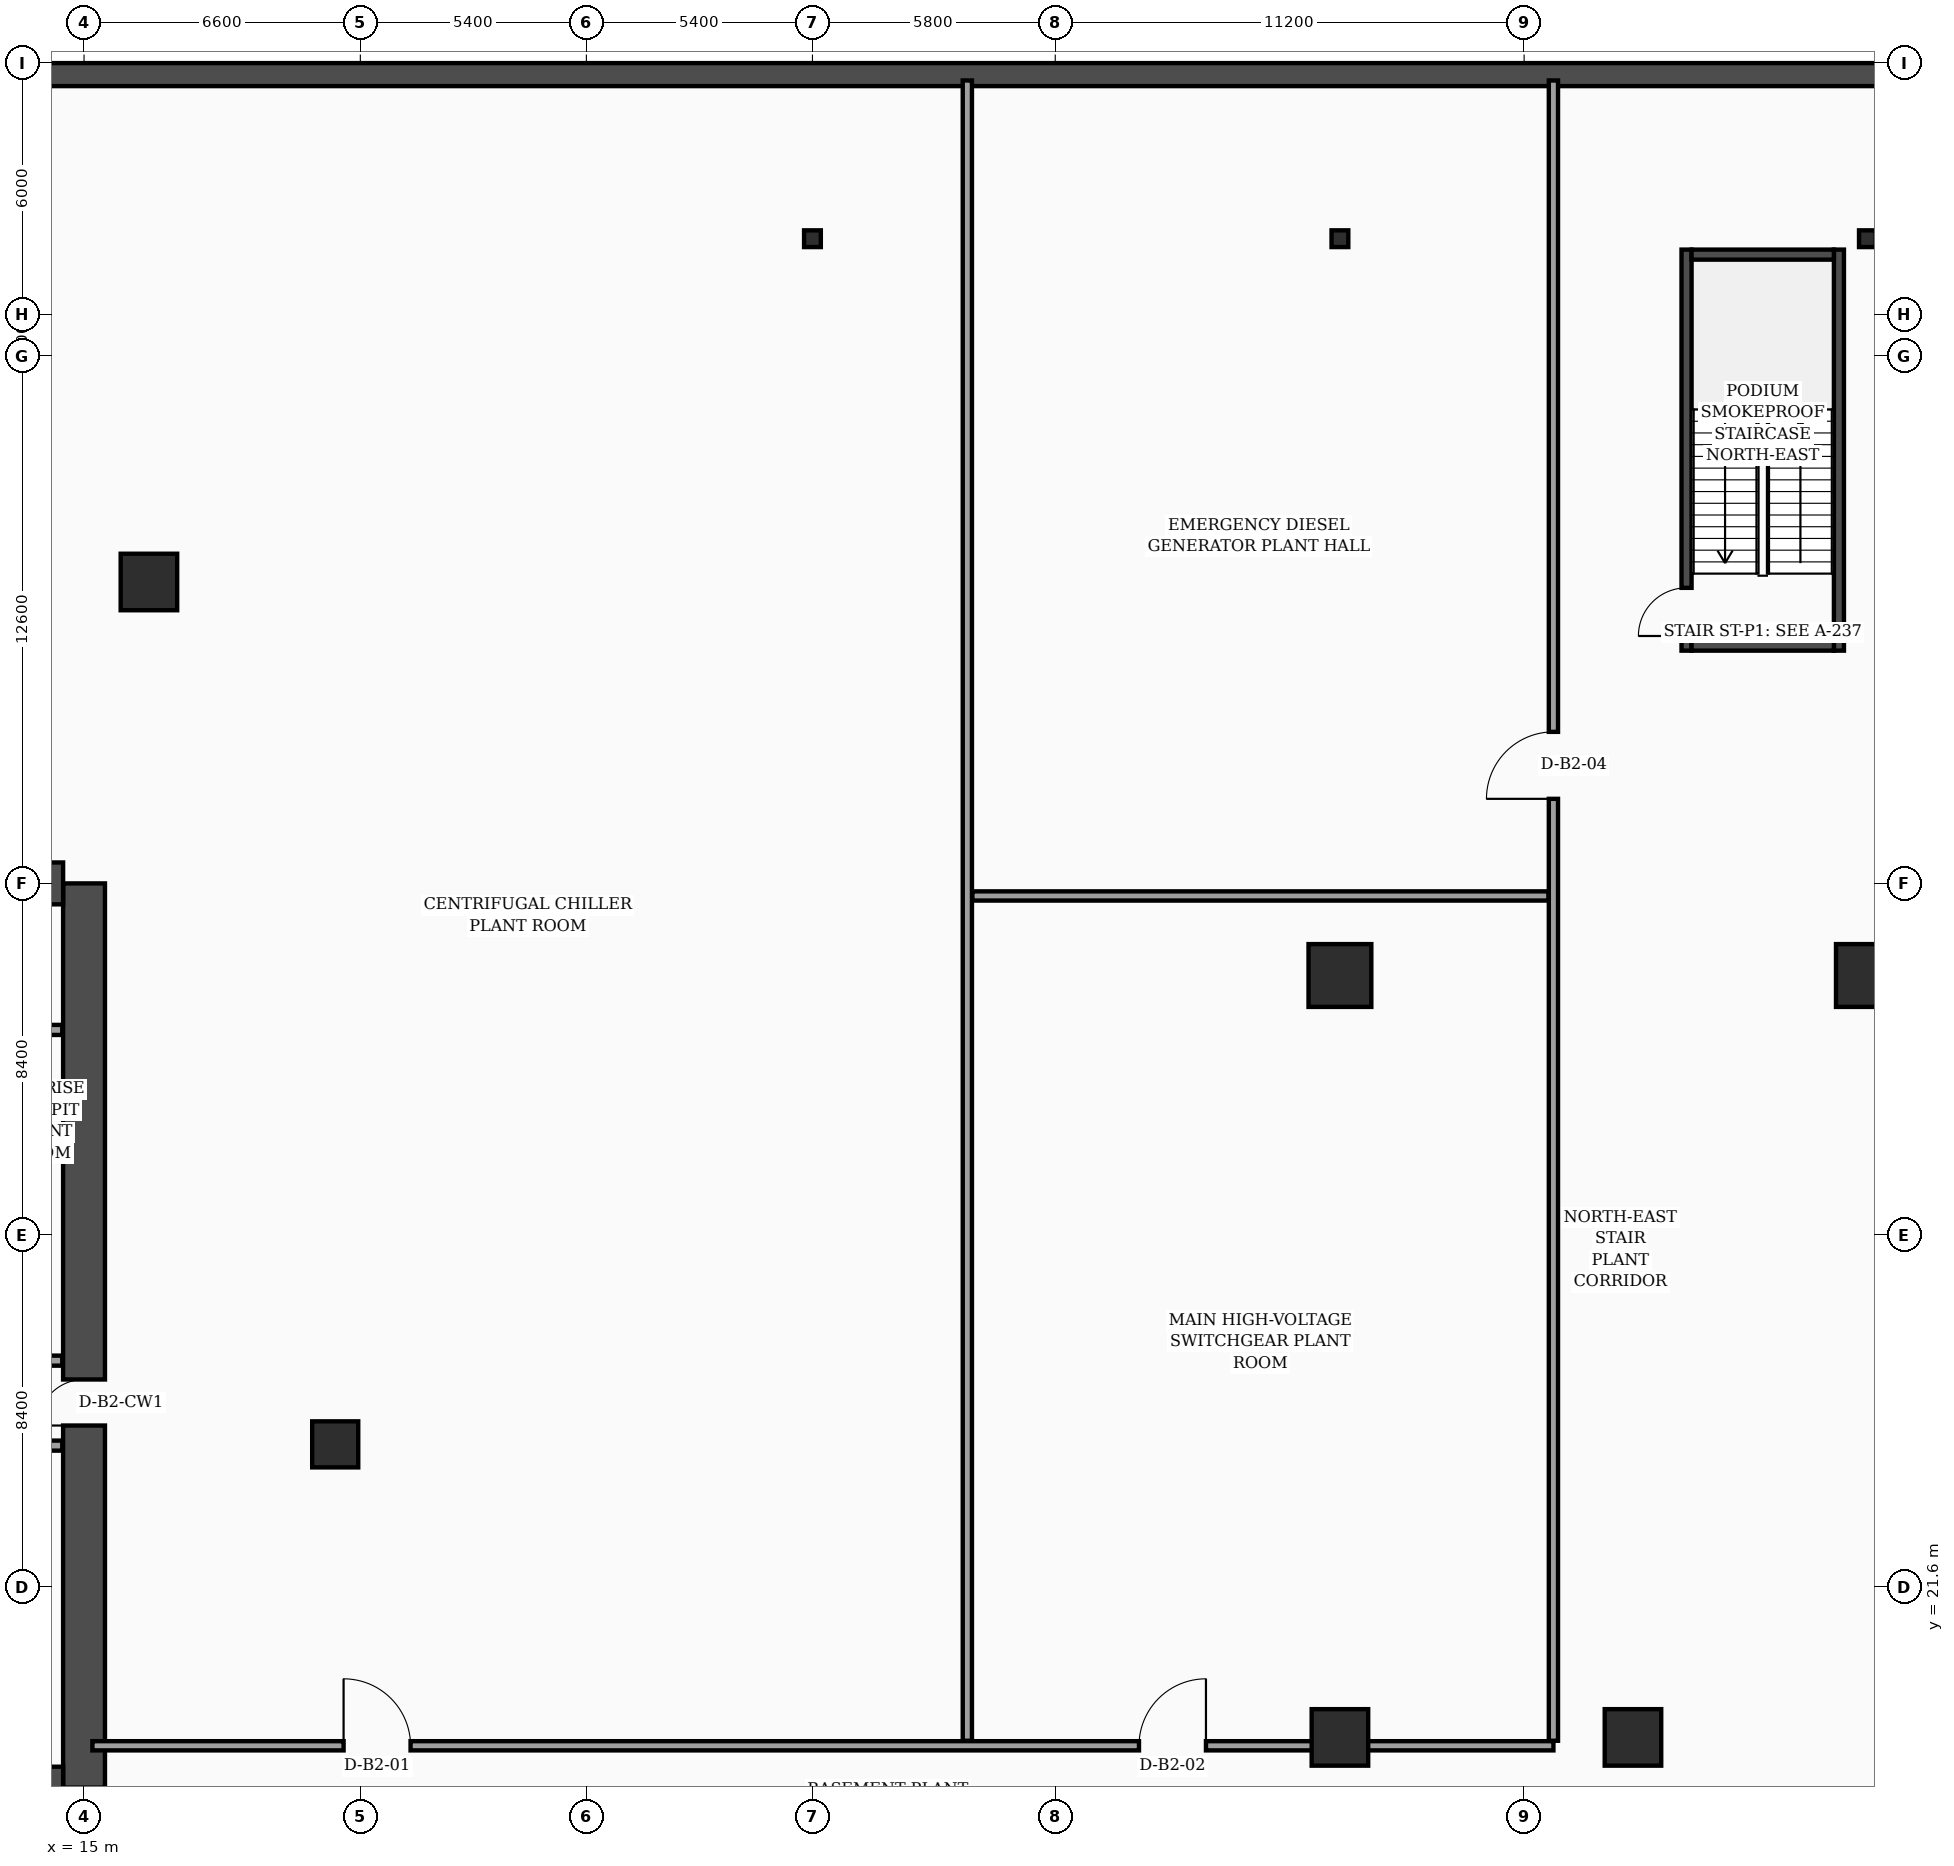
"""IFC4 building model, lengths in metres.
Left out: names, types, materials, properties, quantities, classifications, styles, units other than length and angle.
Written with IfcOpenShell. Run it as: python <this file> out.ifc"""

import sys

from ifc_helpers import new_model, si_unit, direction, frame, frame_2d, origin, origin_2d, place, context, subcontext, project, spatial, rectangle, hollow_rectangle, i_section, extrude, element, fill, save


model = new_model("IFC4")
c1 = context("Model", 3, precision=1e-05, world=origin(), true_north=direction((0.0, 1.0)))
c2 = subcontext(c1, "Body", "Model", "MODEL_VIEW")
j1 = project(units=[si_unit("LENGTHUNIT", "METRE"), si_unit("PLANEANGLEUNIT", "RADIAN")], contexts=[c1])
p1 = place(None, origin())
s1 = spatial("IfcSite", under=j1, at=p1, CompositionType="ELEMENT")
p2 = place(p1, origin())
s2 = spatial("IfcBuilding", under=s1, at=p2, CompositionType="ELEMENT")
p3 = place(p2, frame((0.0, 0.0, -10.4)))
s3 = spatial("IfcBuildingStorey", under=s2, at=p3, CompositionType="ELEMENT", Elevation=-10.4)
p4 = place(p3, frame((83.72, 57.72, 0.0), z_axis=(0.0, 0.0, 1.0), x_axis=(-1.0, 0.0, 0.0)))
e1 = element("IfcWall", 1, at=p4, inside=s3, PredefinedType="USERDEFINED", context=c2, shape_type="SweptSolid", body=[
    extrude(rectangle(XDim=83.44, YDim=0.55, at=frame_2d((41.72, 0.0))), origin(), (0.0, 0.0, 1.0), 4.88),
])
p5 = place(p3, frame((15.0, 16.8, 0.0), z_axis=(0.0, 0.0, 1.0), x_axis=(0.0, 1.0, 0.0)))
e2 = element("IfcWall", 2, at=p5, inside=s3, PredefinedType="SHEAR", context=c2, shape_type="SweptSolid", body=[
    extrude(rectangle(XDim=21.6, YDim=1.0, at=frame_2d((10.8, 0.0))), origin(), (0.0, 0.0, 1.0), 4.88),
])
p6 = place(p5, frame((8.65, 0.0, 0.0)))
e3 = element("IfcOpeningElement", 3, at=p6, cuts=e2, PredefinedType="OPENING", context=c2, shape_type="SweptSolid", body=[
    extrude(rectangle(XDim=1.1, YDim=2.2, at=frame_2d((0.55, 1.1))), frame((0.0, 0.51, 0.0), z_axis=(0.0, -1.0, 0.0), x_axis=(1.0, 0.0, 0.0)), (0.0, 0.0, 1.0), 1.02),
])
for number, where, z_axis, x_axis in (
    (4, (4.7, 38.4, 0.0), (0.0, 0.0, 1.0), (1.0, 0.0, 0.0)),
    (5, (4.7, 16.8, 0.0), (0.0, 0.0, 1.0), (1.0, 0.0, 0.0)),
):
    element("IfcWall", number, at=place(p3, frame(where, z_axis=z_axis, x_axis=x_axis)), inside=s3, PredefinedType="SHEAR", context=c2, shape_type="SweptSolid", body=[
        extrude(rectangle(XDim=9.8, YDim=1.0, at=frame_2d((4.9, 0.0))), origin(), (0.0, 0.0, 1.0), 4.88),
    ])
p7 = place(p3, frame((53.28, 43.96, 0.0), z_axis=(0.0, 0.0, 1.0), x_axis=(0.0, 1.0, 0.0)))
e6 = element("IfcWall", 6, at=p7, inside=s3, PredefinedType="SOLIDWALL", context=c2, shape_type="SweptSolid", body=[
    extrude(rectangle(XDim=9.58, YDim=0.24, at=frame_2d((4.79, 0.0))), origin(), (0.0, 0.0, 1.0), 4.88),
])
p8 = place(p7, frame((0.35, 0.0, 0.0)))
e7 = element("IfcOpeningElement", 7, at=p8, cuts=e6, PredefinedType="OPENING", context=c2, shape_type="SweptSolid", body=[
    extrude(rectangle(XDim=1.15, YDim=2.2, at=frame_2d((0.575, 1.1))), frame((0.0, 0.13, 0.0), z_axis=(0.0, -1.0, 0.0), x_axis=(1.0, 0.0, 0.0)), (0.0, 0.0, 1.0), 0.26),
])
p9 = place(p3, frame((56.92, 43.96, 0.0), z_axis=(0.0, 0.0, 1.0), x_axis=(0.0, 1.0, 0.0)))
e8 = element("IfcWall", 8, at=p9, inside=s3, PredefinedType="SOLIDWALL", context=c2, shape_type="SweptSolid", body=[
    extrude(rectangle(XDim=9.58, YDim=0.24, at=frame_2d((4.79, 0.0))), origin(), (0.0, 0.0, 1.0), 4.88),
])
for number, where, z_axis, x_axis in (
    (9, (53.4, 44.08, 0.0), (0.0, 0.0, 1.0), (1.0, 0.0, 0.0)),
    (10, (53.4, 53.42, 0.0), (0.0, 0.0, 1.0), (1.0, 0.0, 0.0)),
):
    element("IfcWall", number, at=place(p3, frame(where, z_axis=z_axis, x_axis=x_axis)), inside=s3, PredefinedType="SOLIDWALL", context=c2, shape_type="SweptSolid", body=[
        extrude(rectangle(XDim=3.4, YDim=0.24, at=frame_2d((1.7, 0.0))), origin(), (0.0, 0.0, 1.0), 4.88),
    ])
p10 = place(p3, frame((16.55, 45.6, 0.0), z_axis=(0.0, 0.0, 1.0), x_axis=(1.0, 0.0, 0.0)))
e11 = element("IfcColumn", 11, at=p10, inside=s3, PredefinedType="COLUMN", context=c2, shape_type="SweptSolid", body=[
    extrude(rectangle(XDim=1.35, YDim=1.35, at=origin_2d()), origin(), (0.0, 0.0, 1.0), 4.88),
])
p11 = place(p3, frame((21.0, 25.0, 0.0), z_axis=(0.0, 0.0, 1.0), x_axis=(1.0, 0.0, 0.0)))
e12 = element("IfcColumn", 12, at=p11, inside=s3, PredefinedType="COLUMN", context=c2, shape_type="SweptSolid", body=[
    extrude(hollow_rectangle(XDim=1.1, YDim=1.1, WallThickness=0.045, at=origin_2d()), origin(), (0.0, 0.0, 1.0), 4.88),
])
for number, where, z_axis, x_axis in (
    (13, (45.0, 36.2, 0.0), (0.0, 0.0, 1.0), (1.0, 0.0, 0.0)),
    (14, (57.6, 36.2, 0.0), (0.0, 0.0, 1.0), (1.0, 0.0, 0.0)),
):
    element("IfcColumn", number, at=place(p3, frame(where, z_axis=z_axis, x_axis=x_axis)), inside=s3, PredefinedType="COLUMN", context=c2, shape_type="SweptSolid", body=[
        extrude(rectangle(XDim=1.5, YDim=1.5, at=origin_2d()), origin(), (0.0, 0.0, 1.0), 4.88),
    ])
for number, where, z_axis, x_axis in (
    (15, (32.4, 53.8, 0.0), (0.0, 0.0, 1.0), (1.0, 0.0, 0.0)),
    (16, (45.0, 53.8, 0.0), (0.0, 0.0, 1.0), (1.0, 0.0, 0.0)),
    (17, (57.6, 53.8, 0.0), (0.0, 0.0, 1.0), (1.0, 0.0, 0.0)),
):
    element("IfcColumn", number, at=place(p3, frame(where, z_axis=z_axis, x_axis=x_axis)), inside=s3, PredefinedType="PILASTER", context=c2, shape_type="SweptSolid", body=[
        extrude(i_section(OverallWidth=0.4, OverallDepth=0.4, WebThickness=0.013, FlangeThickness=0.021, FilletRadius=0.022, at=origin_2d()), origin(), (0.0, 0.0, 1.0), 4.88),
    ])
for number, where, z_axis, x_axis in (
    (18, (45.0, 18.0, 0.0), (0.0, 0.0, 1.0), (1.0, 0.0, 0.0)),
    (19, (52.0, 18.0, 0.0), (0.0, 0.0, 1.0), (1.0, 0.0, 0.0)),
):
    element("IfcColumn", number, at=place(p3, frame(where, z_axis=z_axis, x_axis=x_axis)), inside=s3, PredefinedType="COLUMN", context=c2, shape_type="SweptSolid", body=[
        extrude(rectangle(XDim=1.35, YDim=1.35, at=origin_2d()), origin(), (0.0, 0.0, 1.0), 4.88),
    ])
p12 = place(p3, frame((9.68, 24.97, 0.0), z_axis=(0.0, 0.0, 1.0), x_axis=(1.0, 0.0, 0.0)))
e20 = element("IfcWall", 20, at=p12, inside=s3, PredefinedType="SOLIDWALL", context=c2, shape_type="SweptSolid", body=[
    extrude(rectangle(XDim=4.8, YDim=0.24, at=frame_2d((2.4, 0.0))), origin(), (0.0, 0.0, 1.0), 4.08),
])
p13 = place(p12, frame((0.85, 0.0, 0.0)))
e21 = element("IfcOpeningElement", 21, at=p13, cuts=e20, PredefinedType="OPENING", context=c2, shape_type="SweptSolid", body=[
    extrude(rectangle(XDim=0.98, YDim=2.15, at=frame_2d((0.49, 1.075))), frame((0.0, 0.13, 0.0), z_axis=(0.0, -1.0, 0.0), x_axis=(1.0, 0.0, 0.0)), (0.0, 0.0, 1.0), 0.26),
])
p14 = place(p3, frame((12.25, 27.0, 0.0), z_axis=(0.0, 0.0, 1.0), x_axis=(1.0, 0.0, 0.0)))
e22 = element("IfcWall", 22, at=p14, inside=s3, PredefinedType="SOLIDWALL", context=c2, shape_type="SweptSolid", body=[
    extrude(rectangle(XDim=2.23, YDim=0.24, at=frame_2d((1.115, 0.0))), origin(), (0.0, 0.0, 1.0), 4.88),
])
p15 = place(p3, frame((9.66, 34.9, 0.0), z_axis=(0.0, 0.0, 1.0), x_axis=(1.0, 0.0, 0.0)))
e23 = element("IfcWall", 23, at=p15, inside=s3, PredefinedType="SOLIDWALL", context=c2, shape_type="SweptSolid", body=[
    extrude(rectangle(XDim=4.82, YDim=0.24, at=frame_2d((2.41, 0.0))), origin(), (0.0, 0.0, 1.0), 4.88),
])
p16 = place(p15, frame((0.65, 0.0, 0.0)))
e24 = element("IfcOpeningElement", 24, at=p16, cuts=e23, PredefinedType="OPENING", context=c2, shape_type="SweptSolid", body=[
    extrude(rectangle(XDim=0.98, YDim=2.15, at=frame_2d((0.49, 1.075))), frame((0.0, 0.13, 0.0), z_axis=(0.0, -1.0, 0.0), x_axis=(1.0, 0.0, 0.0)), (0.0, 0.0, 1.0), 0.26),
])
p17 = place(p3, frame((15.2, 17.8, 0.0), z_axis=(0.0, 0.0, 1.0), x_axis=(1.0, 0.0, 0.0)))
e25 = element("IfcWall", 25, at=p17, inside=s3, PredefinedType="SOLIDWALL", context=c2, shape_type="SweptSolid", body=[
    extrude(rectangle(XDim=34.9, YDim=0.22, at=frame_2d((17.45, 0.0))), origin(), (0.0, 0.0, 1.0), 3.28),
])
p18 = place(p17, frame((6.0, 0.0, 0.0)))
e26 = element("IfcOpeningElement", 26, at=p18, cuts=e25, PredefinedType="OPENING", context=c2, shape_type="SweptSolid", body=[
    extrude(rectangle(XDim=1.6, YDim=2.35, at=frame_2d((0.8, 1.175))), frame((0.0, 0.12, 0.0), z_axis=(0.0, -1.0, 0.0), x_axis=(1.0, 0.0, 0.0)), (0.0, 0.0, 1.0), 0.24),
])
p19 = place(p17, frame((25.0, 0.0, 0.0)))
e27 = element("IfcOpeningElement", 27, at=p19, cuts=e25, PredefinedType="OPENING", context=c2, shape_type="SweptSolid", body=[
    extrude(rectangle(XDim=1.6, YDim=2.35, at=frame_2d((0.8, 1.175))), frame((0.0, 0.12, 0.0), z_axis=(0.0, -1.0, 0.0), x_axis=(1.0, 0.0, 0.0)), (0.0, 0.0, 1.0), 0.24),
])
p20 = place(p3, frame((50.1, 17.92, 0.0), z_axis=(0.0, 0.0, 1.0), x_axis=(0.0, 1.0, 0.0)))
e28 = element("IfcWall", 28, at=p20, inside=s3, PredefinedType="SOLIDWALL", context=c2, shape_type="SweptSolid", body=[
    extrude(rectangle(XDim=39.66, YDim=0.22, at=frame_2d((19.83, 0.0))), origin(), (0.0, 0.0, 1.0), 4.08),
])
p21 = place(p20, frame((22.5, 0.0, 0.0)))
e29 = element("IfcOpeningElement", 29, at=p21, cuts=e28, PredefinedType="OPENING", context=c2, shape_type="SweptSolid", body=[
    extrude(rectangle(XDim=1.6, YDim=2.35, at=frame_2d((0.8, 1.175))), frame((0.0, 0.12, 0.0), z_axis=(0.0, -1.0, 0.0), x_axis=(1.0, 0.0, 0.0)), (0.0, 0.0, 1.0), 0.24),
])
p22 = place(p3, frame((36.1, 17.92, 0.0), z_axis=(0.0, 0.0, 1.0), x_axis=(0.0, 1.0, 0.0)))
e30 = element("IfcWall", 30, at=p22, inside=s3, PredefinedType="SOLIDWALL", context=c2, shape_type="SweptSolid", body=[
    extrude(rectangle(XDim=39.66, YDim=0.22, at=frame_2d((19.83, 0.0))), origin(), (0.0, 0.0, 1.0), 4.08),
])
p23 = place(p3, frame((36.22, 38.1, 0.0), z_axis=(0.0, 0.0, 1.0), x_axis=(1.0, 0.0, 0.0)))
e31 = element("IfcWall", 31, at=p23, inside=s3, PredefinedType="SOLIDWALL", context=c2, shape_type="SweptSolid", body=[
    extrude(rectangle(XDim=13.76, YDim=0.22, at=frame_2d((6.88, 0.0))), origin(), (0.0, 0.0, 1.0), 4.08),
])
p24 = place(p18, origin())
e32 = element("IfcDoor", 32, at=p24, inside=s3, OperationType="SINGLE_SWING_LEFT", PredefinedType="DOOR", context=c2, shape_type="SweptSolid", body=[
    extrude(rectangle(XDim=1.6, YDim=2.35, at=frame_2d((0.8, 1.175))), frame((0.0, 0.025, 0.0), z_axis=(0.0, -1.0, 0.0), x_axis=(1.0, 0.0, 0.0)), (0.0, 0.0, 1.0), 0.05),
])
fill(e26, e32)
p25 = place(p19, origin())
e33 = element("IfcDoor", 33, at=p25, inside=s3, OperationType="SINGLE_SWING_RIGHT", PredefinedType="DOOR", context=c2, shape_type="SweptSolid", body=[
    extrude(rectangle(XDim=1.6, YDim=2.35, at=frame_2d((0.8, 1.175))), frame((0.0, 0.025, 0.0), z_axis=(0.0, -1.0, 0.0), x_axis=(1.0, 0.0, 0.0)), (0.0, 0.0, 1.0), 0.05),
])
fill(e27, e33)
p26 = place(p21, origin())
e34 = element("IfcDoor", 34, at=p26, inside=s3, OperationType="SINGLE_SWING_LEFT", PredefinedType="DOOR", context=c2, shape_type="SweptSolid", body=[
    extrude(rectangle(XDim=1.6, YDim=2.35, at=frame_2d((0.8, 1.175))), frame((0.0, 0.025, 0.0), z_axis=(0.0, -1.0, 0.0), x_axis=(1.0, 0.0, 0.0)), (0.0, 0.0, 1.0), 0.05),
])
fill(e29, e34)
p27 = place(p8, origin())
e35 = element("IfcDoor", 35, at=p27, inside=s3, OperationType="SINGLE_SWING_LEFT", PredefinedType="DOOR", context=c2, shape_type="SweptSolid", body=[
    extrude(rectangle(XDim=1.15, YDim=2.2, at=frame_2d((0.575, 1.1))), frame((0.0, 0.025, 0.0), z_axis=(0.0, -1.0, 0.0), x_axis=(1.0, 0.0, 0.0)), (0.0, 0.0, 1.0), 0.05),
])
fill(e7, e35)
p28 = place(p6, origin())
e36 = element("IfcDoor", 36, at=p28, inside=s3, OperationType="SINGLE_SWING_LEFT", PredefinedType="DOOR", context=c2, shape_type="SweptSolid", body=[
    extrude(rectangle(XDim=1.1, YDim=2.2, at=frame_2d((0.55, 1.1))), frame((0.0, 0.025, 0.0), z_axis=(0.0, -1.0, 0.0), x_axis=(1.0, 0.0, 0.0)), (0.0, 0.0, 1.0), 0.05),
])
fill(e3, e36)
save(model, sys.argv[1])
